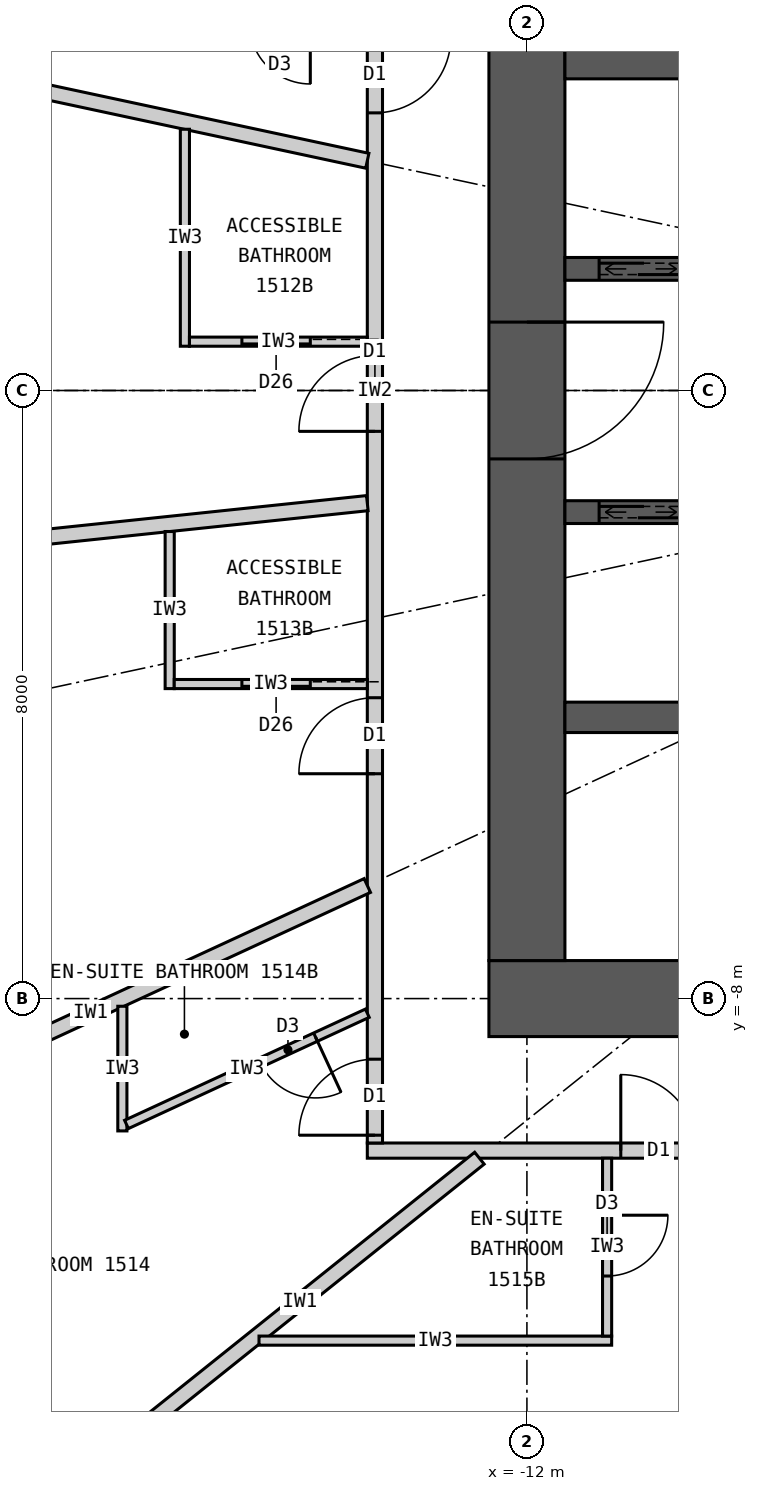
"""IFC4 building model, lengths in metres.
Left out: names, types, materials, properties, quantities, classifications, styles, units other than length and angle.
Written with IfcOpenShell. Run it as: python <this file> out.ifc"""

import sys

from ifc_helpers import new_model, si_unit, direction, frame, frame_2d, origin, place, context, subcontext, project, spatial, rectangle, extrude, element, fill, save


model = new_model("IFC4")
c1 = context("Model", 3, precision=1e-05, world=origin(), true_north=direction((0.0, 1.0)))
c2 = subcontext(c1, "Body", "Model", "MODEL_VIEW")
j1 = project(units=[si_unit("LENGTHUNIT", "METRE"), si_unit("PLANEANGLEUNIT", "RADIAN")], contexts=[c1])
p1 = place(None, origin())
s1 = spatial("IfcSite", under=j1, at=p1, CompositionType="ELEMENT")
p2 = place(p1, origin())
s2 = spatial("IfcBuilding", under=s1, at=p2, CompositionType="ELEMENT")
p3 = place(p2, frame((0.0, 0.0, 63.9)))
s3 = spatial("IfcBuildingStorey", under=s2, at=p3, CompositionType="ELEMENT", Elevation=63.9)
p4 = place(p3, frame((12.5, -8.0, 0.0), z_axis=(0.0, 0.0, 1.0), x_axis=(-1.0, 0.0, 0.0)))
e1 = element("IfcWall", 1, at=p4, inside=s3, PredefinedType="SHEAR", context=c2, shape_type="SweptSolid", body=[
    extrude(rectangle(XDim=25.0, YDim=1.0, at=frame_2d((12.5, 0.0))), origin(), (0.0, 0.0, 1.0), 3.3),
])
p5 = place(p4, frame((11.2, 0.0, 0.0)))
e2 = element("IfcOpeningElement", 2, at=p5, cuts=e1, PredefinedType="OPENING", context=c2, shape_type="SweptSolid", body=[
    extrude(rectangle(XDim=1.2, YDim=2.2, at=frame_2d((0.6, 1.1))), frame((0.0, 0.51, 0.0), z_axis=(0.0, -1.0, 0.0), x_axis=(1.0, 0.0, 0.0)), (0.0, 0.0, 1.0), 1.02),
])
p6 = place(p4, frame((18.8, 0.0, 0.0)))
e3 = element("IfcOpeningElement", 3, at=p6, cuts=e1, PredefinedType="OPENING", context=c2, shape_type="SweptSolid", body=[
    extrude(rectangle(XDim=0.9, YDim=2.2, at=frame_2d((0.45, 1.1))), frame((0.0, 0.51, 0.0), z_axis=(0.0, -1.0, 0.0), x_axis=(1.0, 0.0, 0.0)), (0.0, 0.0, 1.0), 1.02),
])
p7 = place(p3, frame((-12.0, 7.5, 0.0), z_axis=(0.0, 0.0, 1.0), x_axis=(0.0, -1.0, 0.0)))
e4 = element("IfcWall", 4, at=p7, inside=s3, PredefinedType="SHEAR", context=c2, shape_type="SweptSolid", body=[
    extrude(rectangle(XDim=15.0, YDim=1.0, at=frame_2d((7.5, 0.0))), origin(), (0.0, 0.0, 1.0), 3.3),
])
p8 = place(p7, frame((6.6, 0.0, 0.0)))
e5 = element("IfcOpeningElement", 5, at=p8, cuts=e4, PredefinedType="OPENING", context=c2, shape_type="SweptSolid", body=[
    extrude(rectangle(XDim=1.8, YDim=2.2, at=frame_2d((0.9, 1.1))), frame((0.0, 0.51, 0.0), z_axis=(0.0, -1.0, 0.0), x_axis=(1.0, 0.0, 0.0)), (0.0, 0.0, 1.0), 1.02),
])
p9 = place(p3, frame((-11.5, 4.3, 0.0), z_axis=(0.0, 0.0, 1.0), x_axis=(1.0, 0.0, 0.0)))
e6 = element("IfcWall", 6, at=p9, inside=s3, PredefinedType="SHEAR", context=c2, shape_type="SweptSolid", body=[
    extrude(rectangle(XDim=23.0, YDim=0.4, at=frame_2d((11.5, 0.0))), origin(), (0.0, 0.0, 1.0), 3.3),
])
p10 = place(p3, frame((-11.5, 1.6, 0.0), z_axis=(0.0, 0.0, 1.0), x_axis=(1.0, 0.0, 0.0)))
e7 = element("IfcWall", 7, at=p10, inside=s3, PredefinedType="SHEAR", context=c2, shape_type="SweptSolid", body=[
    extrude(rectangle(XDim=23.0, YDim=0.3, at=frame_2d((11.5, 0.0))), origin(), (0.0, 0.0, 1.0), 3.3),
])
p11 = place(p10, frame((0.45, 0.0, 0.0)))
e8 = element("IfcOpeningElement", 8, at=p11, cuts=e7, PredefinedType="OPENING", context=c2, shape_type="SweptSolid", body=[
    extrude(rectangle(XDim=1.1, YDim=2.2, at=frame_2d((0.55, 1.1))), frame((0.0, 0.16, 0.0), z_axis=(0.0, -1.0, 0.0), x_axis=(1.0, 0.0, 0.0)), (0.0, 0.0, 1.0), 0.32),
])
p12 = place(p10, frame((3.45, 0.0, 0.0)))
e9 = element("IfcOpeningElement", 9, at=p12, cuts=e7, PredefinedType="OPENING", context=c2, shape_type="SweptSolid", body=[
    extrude(rectangle(XDim=1.1, YDim=2.2, at=frame_2d((0.55, 1.1))), frame((0.0, 0.16, 0.0), z_axis=(0.0, -1.0, 0.0), x_axis=(1.0, 0.0, 0.0)), (0.0, 0.0, 1.0), 0.32),
])
p13 = place(p10, frame((6.55, 0.0, 0.0)))
e10 = element("IfcOpeningElement", 10, at=p13, cuts=e7, PredefinedType="OPENING", context=c2, shape_type="SweptSolid", body=[
    extrude(rectangle(XDim=0.9, YDim=2.2, at=frame_2d((0.45, 1.1))), frame((0.0, 0.16, 0.0), z_axis=(0.0, -1.0, 0.0), x_axis=(1.0, 0.0, 0.0)), (0.0, 0.0, 1.0), 0.32),
])
p14 = place(p10, frame((12.55, 0.0, 0.0)))
e11 = element("IfcOpeningElement", 11, at=p14, cuts=e7, PredefinedType="OPENING", context=c2, shape_type="SweptSolid", body=[
    extrude(rectangle(XDim=0.9, YDim=2.2, at=frame_2d((0.45, 1.1))), frame((0.0, 0.16, 0.0), z_axis=(0.0, -1.0, 0.0), x_axis=(1.0, 0.0, 0.0)), (0.0, 0.0, 1.0), 0.32),
])
p15 = place(p3, frame((-11.5, -4.3, 0.0), z_axis=(0.0, 0.0, 1.0), x_axis=(1.0, 0.0, 0.0)))
e12 = element("IfcWall", 12, at=p15, inside=s3, PredefinedType="SHEAR", context=c2, shape_type="SweptSolid", body=[
    extrude(rectangle(XDim=23.0, YDim=0.4, at=frame_2d((11.5, 0.0))), origin(), (0.0, 0.0, 1.0), 3.3),
])
p16 = place(p3, frame((-11.5, -1.6, 0.0), z_axis=(0.0, 0.0, 1.0), x_axis=(1.0, 0.0, 0.0)))
e13 = element("IfcWall", 13, at=p16, inside=s3, PredefinedType="SHEAR", context=c2, shape_type="SweptSolid", body=[
    extrude(rectangle(XDim=23.0, YDim=0.3, at=frame_2d((11.5, 0.0))), origin(), (0.0, 0.0, 1.0), 3.3),
])
p17 = place(p16, frame((0.45, 0.0, 0.0)))
e14 = element("IfcOpeningElement", 14, at=p17, cuts=e13, PredefinedType="OPENING", context=c2, shape_type="SweptSolid", body=[
    extrude(rectangle(XDim=1.1, YDim=2.2, at=frame_2d((0.55, 1.1))), frame((0.0, 0.16, 0.0), z_axis=(0.0, -1.0, 0.0), x_axis=(1.0, 0.0, 0.0)), (0.0, 0.0, 1.0), 0.32),
])
p18 = place(p16, frame((3.45, 0.0, 0.0)))
e15 = element("IfcOpeningElement", 15, at=p18, cuts=e13, PredefinedType="OPENING", context=c2, shape_type="SweptSolid", body=[
    extrude(rectangle(XDim=1.1, YDim=2.2, at=frame_2d((0.55, 1.1))), frame((0.0, 0.16, 0.0), z_axis=(0.0, -1.0, 0.0), x_axis=(1.0, 0.0, 0.0)), (0.0, 0.0, 1.0), 0.32),
])
p19 = place(p16, frame((15.2, 0.0, 0.0)))
e16 = element("IfcOpeningElement", 16, at=p19, cuts=e13, PredefinedType="OPENING", context=c2, shape_type="SweptSolid", body=[
    extrude(rectangle(XDim=1.6, YDim=2.4, at=frame_2d((0.8, 1.2))), frame((0.0, 0.16, 0.0), z_axis=(0.0, -1.0, 0.0), x_axis=(1.0, 0.0, 0.0)), (0.0, 0.0, 1.0), 0.32),
])
p20 = place(p16, frame((8.05, 0.0, 0.0)))
e17 = element("IfcOpeningElement", 17, at=p20, cuts=e13, PredefinedType="OPENING", context=c2, shape_type="SweptSolid", body=[
    extrude(rectangle(XDim=0.9, YDim=2.2, at=frame_2d((0.45, 1.1))), frame((0.0, 0.16, 0.0), z_axis=(0.0, -1.0, 0.0), x_axis=(1.0, 0.0, 0.0)), (0.0, 0.0, 1.0), 0.32),
])
p21 = place(p16, frame((12.55, 0.0, 0.0)))
e18 = element("IfcOpeningElement", 18, at=p21, cuts=e13, PredefinedType="OPENING", context=c2, shape_type="SweptSolid", body=[
    extrude(rectangle(XDim=0.9, YDim=2.2, at=frame_2d((0.45, 1.1))), frame((0.0, 0.16, 0.0), z_axis=(0.0, -1.0, 0.0), x_axis=(1.0, 0.0, 0.0)), (0.0, 0.0, 1.0), 0.32),
])
p22 = place(p3, frame((14.1, -10.0, 0.0), z_axis=(0.0, 0.0, 1.0), x_axis=(-1.0, 0.0, 0.0)))
e19 = element("IfcWall", 19, at=p22, inside=s3, PredefinedType="PARTITIONING", context=c2, shape_type="SweptSolid", body=[
    extrude(rectangle(XDim=28.2, YDim=0.2, at=frame_2d((14.1, 0.0))), origin(), (0.0, 0.0, 1.0), 3.12),
])
p23 = place(p22, frame((23.865, 0.0, 0.0)))
e20 = element("IfcOpeningElement", 20, at=p23, cuts=e19, PredefinedType="OPENING", context=c2, shape_type="SweptSolid", body=[
    extrude(rectangle(XDim=1.0, YDim=2.2, at=frame_2d((0.5, 1.1))), frame((0.0, 0.11, 0.0), z_axis=(0.0, -1.0, 0.0), x_axis=(1.0, 0.0, 0.0)), (0.0, 0.0, 1.0), 0.22),
])
p24 = place(p22, frame((18.529, 0.0, 0.0)))
e21 = element("IfcOpeningElement", 21, at=p24, cuts=e19, PredefinedType="OPENING", context=c2, shape_type="SweptSolid", body=[
    extrude(rectangle(XDim=1.0, YDim=2.2, at=frame_2d((0.5, 1.1))), frame((0.0, 0.11, 0.0), z_axis=(0.0, -1.0, 0.0), x_axis=(1.0, 0.0, 0.0)), (0.0, 0.0, 1.0), 0.22),
])
p25 = place(p22, frame((14.623, 0.0, 0.0)))
e22 = element("IfcOpeningElement", 22, at=p25, cuts=e19, PredefinedType="OPENING", context=c2, shape_type="SweptSolid", body=[
    extrude(rectangle(XDim=1.0, YDim=2.2, at=frame_2d((0.5, 1.1))), frame((0.0, 0.11, 0.0), z_axis=(0.0, -1.0, 0.0), x_axis=(1.0, 0.0, 0.0)), (0.0, 0.0, 1.0), 0.22),
])
p26 = place(p22, frame((11.24, 0.0, 0.0)))
e23 = element("IfcOpeningElement", 23, at=p26, cuts=e19, PredefinedType="OPENING", context=c2, shape_type="SweptSolid", body=[
    extrude(rectangle(XDim=1.0, YDim=2.2, at=frame_2d((0.5, 1.1))), frame((0.0, 0.11, 0.0), z_axis=(0.0, -1.0, 0.0), x_axis=(1.0, 0.0, 0.0)), (0.0, 0.0, 1.0), 0.22),
])
p27 = place(p22, frame((8.671, 0.0, 0.0)))
e24 = element("IfcOpeningElement", 24, at=p27, cuts=e19, PredefinedType="OPENING", context=c2, shape_type="SweptSolid", body=[
    extrude(rectangle(XDim=1.0, YDim=2.2, at=frame_2d((0.5, 1.1))), frame((0.0, 0.11, 0.0), z_axis=(0.0, -1.0, 0.0), x_axis=(1.0, 0.0, 0.0)), (0.0, 0.0, 1.0), 0.22),
])
p28 = place(p22, frame((2.801, 0.0, 0.0)))
e25 = element("IfcOpeningElement", 25, at=p28, cuts=e19, PredefinedType="OPENING", context=c2, shape_type="SweptSolid", body=[
    extrude(rectangle(XDim=1.0, YDim=2.2, at=frame_2d((0.5, 1.1))), frame((0.0, 0.11, 0.0), z_axis=(0.0, -1.0, 0.0), x_axis=(1.0, 0.0, 0.0)), (0.0, 0.0, 1.0), 0.22),
])
p29 = place(p3, frame((-14.0, 9.9, 0.0), z_axis=(0.0, 0.0, 1.0), x_axis=(0.0, -1.0, 0.0)))
e26 = element("IfcWall", 26, at=p29, inside=s3, PredefinedType="PARTITIONING", context=c2, shape_type="SweptSolid", body=[
    extrude(rectangle(XDim=19.8, YDim=0.2, at=frame_2d((9.9, 0.0))), origin(), (0.0, 0.0, 1.0), 3.12),
])
p30 = place(p29, frame((0.103, 0.0, 0.0)))
e27 = element("IfcOpeningElement", 27, at=p30, cuts=e26, PredefinedType="OPENING", context=c2, shape_type="SweptSolid", body=[
    extrude(rectangle(XDim=1.0, YDim=2.2, at=frame_2d((0.5, 1.1))), frame((0.0, 0.11, 0.0), z_axis=(0.0, -1.0, 0.0), x_axis=(1.0, 0.0, 0.0)), (0.0, 0.0, 1.0), 0.22),
])
p31 = place(p29, frame((5.248, 0.0, 0.0)))
e28 = element("IfcOpeningElement", 28, at=p31, cuts=e26, PredefinedType="OPENING", context=c2, shape_type="SweptSolid", body=[
    extrude(rectangle(XDim=1.0, YDim=2.2, at=frame_2d((0.5, 1.1))), frame((0.0, 0.11, 0.0), z_axis=(0.0, -1.0, 0.0), x_axis=(1.0, 0.0, 0.0)), (0.0, 0.0, 1.0), 0.22),
])
p32 = place(p29, frame((9.438, 0.0, 0.0)))
e29 = element("IfcOpeningElement", 29, at=p32, cuts=e26, PredefinedType="OPENING", context=c2, shape_type="SweptSolid", body=[
    extrude(rectangle(XDim=1.0, YDim=2.2, at=frame_2d((0.5, 1.1))), frame((0.0, 0.11, 0.0), z_axis=(0.0, -1.0, 0.0), x_axis=(1.0, 0.0, 0.0)), (0.0, 0.0, 1.0), 0.22),
])
p33 = place(p29, frame((13.942, 0.0, 0.0)))
e30 = element("IfcOpeningElement", 30, at=p33, cuts=e26, PredefinedType="OPENING", context=c2, shape_type="SweptSolid", body=[
    extrude(rectangle(XDim=1.0, YDim=2.2, at=frame_2d((0.5, 1.1))), frame((0.0, 0.11, 0.0), z_axis=(0.0, -1.0, 0.0), x_axis=(1.0, 0.0, 0.0)), (0.0, 0.0, 1.0), 0.22),
])
p34 = place(p29, frame((18.698, 0.0, 0.0)))
e31 = element("IfcOpeningElement", 31, at=p34, cuts=e26, PredefinedType="OPENING", context=c2, shape_type="SweptSolid", body=[
    extrude(rectangle(XDim=1.0, YDim=2.2, at=frame_2d((0.5, 1.1))), frame((0.0, 0.11, 0.0), z_axis=(0.0, -1.0, 0.0), x_axis=(1.0, 0.0, 0.0)), (0.0, 0.0, 1.0), 0.22),
])
p35 = place(p3, frame((-14.1, 3.022, 0.0), z_axis=(0.0, 0.0, 1.0), x_axis=(-0.977790014929, 0.209586943072, 0.0)))
e32 = element("IfcWall", 32, at=p35, inside=s3, PredefinedType="PARTITIONING", context=c2, shape_type="SweptSolid", body=[
    extrude(rectangle(XDim=10.087, YDim=0.2, at=frame_2d((5.043, 0.0))), origin(), (0.0, 0.0, 1.0), 2.32),
])
p36 = place(p3, frame((-14.1, -1.482, 0.0), z_axis=(0.0, 0.0, 1.0), x_axis=(-0.994522076235, -0.104526742422, 0.0)))
e33 = element("IfcWall", 33, at=p36, inside=s3, PredefinedType="PARTITIONING", context=c2, shape_type="SweptSolid", body=[
    extrude(rectangle(XDim=11.821, YDim=0.2, at=frame_2d((5.91, 0.0))), origin(), (0.0, 0.0, 1.0), 2.32),
])
p37 = place(p3, frame((-14.1, -6.512, 0.0), z_axis=(0.0, 0.0, 1.0), x_axis=(-0.907832871056, -0.419332181247, 0.0)))
e34 = element("IfcWall", 34, at=p37, inside=s3, PredefinedType="PARTITIONING", context=c2, shape_type="SweptSolid", body=[
    extrude(rectangle(XDim=8.023, YDim=0.2, at=frame_2d((4.011, 0.0))), origin(), (0.0, 0.0, 1.0), 2.32),
])
p38 = place(p3, frame((-12.625, -10.1, 0.0), z_axis=(0.0, 0.0, 1.0), x_axis=(-0.780892451574, -0.624665493744, 0.0)))
e35 = element("IfcWall", 35, at=p38, inside=s3, PredefinedType="PARTITIONING", context=c2, shape_type="SweptSolid", body=[
    extrude(rectangle(XDim=6.045, YDim=0.2, at=frame_2d((3.022, 0.0))), origin(), (0.0, 0.0, 1.0), 2.32),
])
p39 = place(p3, frame((-7.289, -10.1, 0.0), z_axis=(0.0, 0.0, 1.0), x_axis=(-0.585198353053, -0.810890182197, 0.0)))
e36 = element("IfcWall", 36, at=p39, inside=s3, PredefinedType="PARTITIONING", context=c2, shape_type="SweptSolid", body=[
    extrude(rectangle(XDim=8.36, YDim=0.2, at=frame_2d((4.18, 0.0))), origin(), (0.0, 0.0, 1.0), 2.32),
])
p40 = place(p3, frame((-16.5, 3.437, 0.0), z_axis=(0.0, 0.0, 1.0), x_axis=(0.0, -1.0, 0.0)))
e37 = element("IfcWall", 37, at=p40, inside=s3, PredefinedType="PARTITIONING", context=c2, shape_type="SweptSolid", body=[
    extrude(rectangle(XDim=2.854, YDim=0.12, at=frame_2d((1.427, 0.0))), origin(), (0.0, 0.0, 1.0), 3.12),
])
p41 = place(p3, frame((-14.1, 0.643, 0.0), z_axis=(0.0, 0.0, 1.0), x_axis=(-1.0, 0.0, 0.0)))
e38 = element("IfcWall", 38, at=p41, inside=s3, PredefinedType="PARTITIONING", context=c2, shape_type="SweptSolid", body=[
    extrude(rectangle(XDim=2.34, YDim=0.12, at=frame_2d((1.17, 0.0))), origin(), (0.0, 0.0, 1.0), 3.12),
])
p42 = place(p41, frame((0.75, 0.0, 0.0)))
e39 = element("IfcOpeningElement", 39, at=p42, cuts=e38, PredefinedType="OPENING", context=c2, shape_type="SweptSolid", body=[
    extrude(rectangle(XDim=0.9, YDim=2.1, at=frame_2d((0.45, 1.05))), frame((0.0, 0.07, 0.0), z_axis=(0.0, -1.0, 0.0), x_axis=(1.0, 0.0, 0.0)), (0.0, 0.0, 1.0), 0.14),
])
p43 = place(p3, frame((-16.7, -1.855, 0.0), z_axis=(0.0, 0.0, 1.0), x_axis=(0.0, -1.0, 0.0)))
e40 = element("IfcWall", 40, at=p43, inside=s3, PredefinedType="PARTITIONING", context=c2, shape_type="SweptSolid", body=[
    extrude(rectangle(XDim=2.067, YDim=0.12, at=frame_2d((1.033, 0.0))), origin(), (0.0, 0.0, 1.0), 3.12),
])
p44 = place(p3, frame((-14.1, -3.862, 0.0), z_axis=(0.0, 0.0, 1.0), x_axis=(-1.0, 0.0, 0.0)))
e41 = element("IfcWall", 41, at=p44, inside=s3, PredefinedType="PARTITIONING", context=c2, shape_type="SweptSolid", body=[
    extrude(rectangle(XDim=2.54, YDim=0.12, at=frame_2d((1.27, 0.0))), origin(), (0.0, 0.0, 1.0), 2.32),
])
p45 = place(p44, frame((0.75, 0.0, 0.0)))
e42 = element("IfcOpeningElement", 42, at=p45, cuts=e41, PredefinedType="OPENING", context=c2, shape_type="SweptSolid", body=[
    extrude(rectangle(XDim=0.9, YDim=2.1, at=frame_2d((0.45, 1.05))), frame((0.0, 0.07, 0.0), z_axis=(0.0, -1.0, 0.0), x_axis=(1.0, 0.0, 0.0)), (0.0, 0.0, 1.0), 0.14),
])
p46 = place(p3, frame((-17.323, -8.101, 0.0), z_axis=(0.0, 0.0, 1.0), x_axis=(0.0, -1.0, 0.0)))
e43 = element("IfcWall", 43, at=p46, inside=s3, PredefinedType="PARTITIONING", context=c2, shape_type="SweptSolid", body=[
    extrude(rectangle(XDim=1.64, YDim=0.12, at=frame_2d((0.82, 0.0))), origin(), (0.0, 0.0, 1.0), 3.12),
])
p47 = place(p3, frame((-14.1, -8.193, 0.0), z_axis=(0.0, 0.0, 1.0), x_axis=(-0.907836493557, -0.419324338628, 0.0)))
e44 = element("IfcWall", 44, at=p47, inside=s3, PredefinedType="PARTITIONING", context=c2, shape_type="SweptSolid", body=[
    extrude(rectangle(XDim=3.49, YDim=0.12, at=frame_2d((1.745, 0.0))), origin(), (0.0, 0.0, 1.0), 3.12),
])
p48 = place(p47, frame((0.75, 0.0, 0.0)))
e45 = element("IfcOpeningElement", 45, at=p48, cuts=e44, PredefinedType="OPENING", context=c2, shape_type="SweptSolid", body=[
    extrude(rectangle(XDim=0.8, YDim=2.1, at=frame_2d((0.4, 1.05))), frame((0.0, 0.07, 0.0), z_axis=(0.0, -1.0, 0.0), x_axis=(1.0, 0.0, 0.0)), (0.0, 0.0, 1.0), 0.14),
])
p49 = place(p3, frame((-15.525, -12.5, 0.0), z_axis=(0.0, 0.0, 1.0), x_axis=(1.0, 0.0, 0.0)))
e46 = element("IfcWall", 46, at=p49, inside=s3, PredefinedType="PARTITIONING", context=c2, shape_type="SweptSolid", body=[
    extrude(rectangle(XDim=4.64, YDim=0.12, at=frame_2d((2.32, 0.0))), origin(), (0.0, 0.0, 1.0), 3.12),
])
p50 = place(p3, frame((-10.945, -10.1, 0.0), z_axis=(0.0, 0.0, 1.0), x_axis=(0.0, -1.0, 0.0)))
e47 = element("IfcWall", 47, at=p50, inside=s3, PredefinedType="PARTITIONING", context=c2, shape_type="SweptSolid", body=[
    extrude(rectangle(XDim=2.34, YDim=0.12, at=frame_2d((1.17, 0.0))), origin(), (0.0, 0.0, 1.0), 3.12),
])
p51 = place(p50, frame((0.75, 0.0, 0.0)))
e48 = element("IfcOpeningElement", 48, at=p51, cuts=e47, PredefinedType="OPENING", context=c2, shape_type="SweptSolid", body=[
    extrude(rectangle(XDim=0.8, YDim=2.1, at=frame_2d((0.4, 1.05))), frame((0.0, 0.07, 0.0), z_axis=(0.0, -1.0, 0.0), x_axis=(1.0, 0.0, 0.0)), (0.0, 0.0, 1.0), 0.14),
])
p52 = place(p31, origin())
e49 = element("IfcDoor", 49, at=p52, inside=s3, OperationType="SINGLE_SWING_LEFT", PredefinedType="DOOR", context=c2, shape_type="SweptSolid", body=[
    extrude(rectangle(XDim=1.0, YDim=2.2, at=frame_2d((0.5, 1.1))), frame((0.0, 0.025, 0.0), z_axis=(0.0, -1.0, 0.0), x_axis=(1.0, 0.0, 0.0)), (0.0, 0.0, 1.0), 0.05),
])
fill(e28, e49)
p53 = place(p42, origin())
e50 = element("IfcDoor", 50, at=p53, inside=s3, OperationType="SLIDING_TO_LEFT", PredefinedType="DOOR", context=c2, shape_type="SweptSolid", body=[
    extrude(rectangle(XDim=0.9, YDim=2.1, at=frame_2d((0.45, 1.05))), frame((0.0, 0.025, 0.0), z_axis=(0.0, -1.0, 0.0), x_axis=(1.0, 0.0, 0.0)), (0.0, 0.0, 1.0), 0.05),
])
fill(e39, e50)
p54 = place(p32, origin())
e51 = element("IfcDoor", 51, at=p54, inside=s3, OperationType="SINGLE_SWING_RIGHT", PredefinedType="DOOR", context=c2, shape_type="SweptSolid", body=[
    extrude(rectangle(XDim=1.0, YDim=2.2, at=frame_2d((0.5, 1.1))), frame((0.0, 0.025, 0.0), z_axis=(0.0, -1.0, 0.0), x_axis=(1.0, 0.0, 0.0)), (0.0, 0.0, 1.0), 0.05),
])
fill(e29, e51)
p55 = place(p45, origin())
e52 = element("IfcDoor", 52, at=p55, inside=s3, OperationType="SLIDING_TO_LEFT", PredefinedType="DOOR", context=c2, shape_type="SweptSolid", body=[
    extrude(rectangle(XDim=0.9, YDim=2.1, at=frame_2d((0.45, 1.05))), frame((0.0, 0.025, 0.0), z_axis=(0.0, -1.0, 0.0), x_axis=(1.0, 0.0, 0.0)), (0.0, 0.0, 1.0), 0.05),
])
fill(e42, e52)
p56 = place(p33, origin())
e53 = element("IfcDoor", 53, at=p56, inside=s3, OperationType="SINGLE_SWING_RIGHT", PredefinedType="DOOR", context=c2, shape_type="SweptSolid", body=[
    extrude(rectangle(XDim=1.0, YDim=2.2, at=frame_2d((0.5, 1.1))), frame((0.0, 0.025, 0.0), z_axis=(0.0, -1.0, 0.0), x_axis=(1.0, 0.0, 0.0)), (0.0, 0.0, 1.0), 0.05),
])
fill(e30, e53)
p57 = place(p48, origin())
e54 = element("IfcDoor", 54, at=p57, inside=s3, OperationType="SINGLE_SWING_LEFT", PredefinedType="DOOR", context=c2, shape_type="SweptSolid", body=[
    extrude(rectangle(XDim=0.8, YDim=2.1, at=frame_2d((0.4, 1.05))), frame((0.0, 0.025, 0.0), z_axis=(0.0, -1.0, 0.0), x_axis=(1.0, 0.0, 0.0)), (0.0, 0.0, 1.0), 0.05),
])
fill(e45, e54)
p58 = place(p34, origin())
e55 = element("IfcDoor", 55, at=p58, inside=s3, OperationType="SINGLE_SWING_RIGHT", PredefinedType="DOOR", context=c2, shape_type="SweptSolid", body=[
    extrude(rectangle(XDim=1.0, YDim=2.2, at=frame_2d((0.5, 1.1))), frame((0.0, 0.025, 0.0), z_axis=(0.0, -1.0, 0.0), x_axis=(1.0, 0.0, 0.0)), (0.0, 0.0, 1.0), 0.05),
])
fill(e31, e55)
p59 = place(p51, origin())
e56 = element("IfcDoor", 56, at=p59, inside=s3, OperationType="SINGLE_SWING_LEFT", PredefinedType="DOOR", context=c2, shape_type="SweptSolid", body=[
    extrude(rectangle(XDim=0.8, YDim=2.1, at=frame_2d((0.4, 1.05))), frame((0.0, 0.025, 0.0), z_axis=(0.0, -1.0, 0.0), x_axis=(1.0, 0.0, 0.0)), (0.0, 0.0, 1.0), 0.05),
])
fill(e48, e56)
p60 = place(p23, origin())
e57 = element("IfcDoor", 57, at=p60, inside=s3, OperationType="SINGLE_SWING_RIGHT", PredefinedType="DOOR", context=c2, shape_type="SweptSolid", body=[
    extrude(rectangle(XDim=1.0, YDim=2.2, at=frame_2d((0.5, 1.1))), frame((0.0, 0.025, 0.0), z_axis=(0.0, -1.0, 0.0), x_axis=(1.0, 0.0, 0.0)), (0.0, 0.0, 1.0), 0.05),
])
fill(e20, e57)
p61 = place(p11, origin())
e58 = element("IfcDoor", 58, at=p61, inside=s3, OperationType="DOUBLE_DOOR_SLIDING", PredefinedType="DOOR", context=c2, shape_type="SweptSolid", body=[
    extrude(rectangle(XDim=1.1, YDim=2.2, at=frame_2d((0.55, 1.1))), frame((0.0, 0.025, 0.0), z_axis=(0.0, -1.0, 0.0), x_axis=(1.0, 0.0, 0.0)), (0.0, 0.0, 1.0), 0.05),
])
fill(e8, e58)
p62 = place(p17, origin())
e59 = element("IfcDoor", 59, at=p62, inside=s3, OperationType="DOUBLE_DOOR_SLIDING", PredefinedType="DOOR", context=c2, shape_type="SweptSolid", body=[
    extrude(rectangle(XDim=1.1, YDim=2.2, at=frame_2d((0.55, 1.1))), frame((0.0, 0.025, 0.0), z_axis=(0.0, -1.0, 0.0), x_axis=(1.0, 0.0, 0.0)), (0.0, 0.0, 1.0), 0.05),
])
fill(e14, e59)
p63 = place(p8, origin())
e60 = element("IfcDoor", 60, at=p63, inside=s3, OperationType="DOUBLE_DOOR_DOUBLE_SWING", PredefinedType="DOOR", context=c2, shape_type="SweptSolid", body=[
    extrude(rectangle(XDim=1.8, YDim=2.2, at=frame_2d((0.9, 1.1))), frame((0.0, 0.025, 0.0), z_axis=(0.0, -1.0, 0.0), x_axis=(1.0, 0.0, 0.0)), (0.0, 0.0, 1.0), 0.05),
])
fill(e5, e60)
save(model, sys.argv[1])
